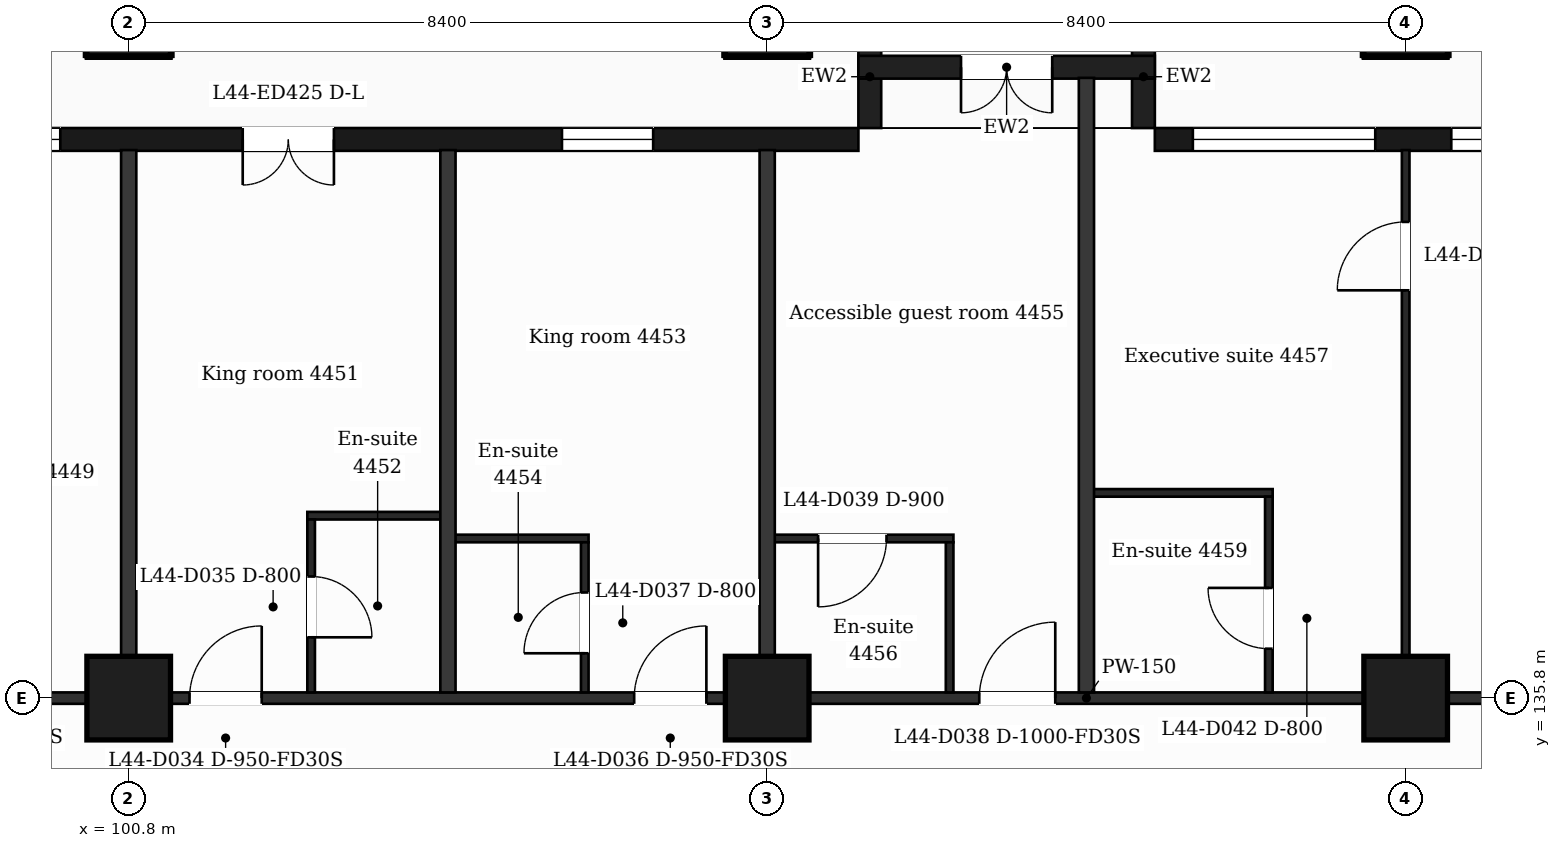
"""IFC4 building model, lengths in metres.
Left out: names, types, materials, properties, quantities, classifications, styles, units other than length and angle.
Written with IfcOpenShell. Run it as: python <this file> out.ifc"""

import sys

from ifc_helpers import new_model, si_unit, direction, frame, frame_2d, origin, origin_2d, place, context, subcontext, project, spatial, rectangle, extrude, element, fill, save


model = new_model("IFC4")
c1 = context("Model", 3, precision=1e-05, world=origin(), true_north=direction((0.0, 1.0)))
c2 = subcontext(c1, "Body", "Model", "MODEL_VIEW")
j1 = project(units=[si_unit("LENGTHUNIT", "METRE"), si_unit("PLANEANGLEUNIT", "RADIAN")], contexts=[c1])
p1 = place(None, origin())
s1 = spatial("IfcSite", under=j1, at=p1, CompositionType="ELEMENT")
p2 = place(p1, origin())
s2 = spatial("IfcBuilding", under=s1, at=p2, CompositionType="ELEMENT")
p3 = place(p2, frame((0.0, 0.0, 184.8)))
s3 = spatial("IfcBuildingStorey", under=s2, at=p3, CompositionType="ELEMENT", Elevation=184.8)
for number, where, z_axis, x_axis in (
    (1, (100.8, 135.8, 0.0), (0.0, 0.0, 1.0), (1.0, 0.0, 0.0)),
    (2, (109.2, 135.8, 0.0), (0.0, 0.0, 1.0), (1.0, 0.0, 0.0)),
    (3, (117.6, 135.8, 0.0), (0.0, 0.0, 1.0), (1.0, 0.0, 0.0)),
    (4, (100.8, 144.8, 0.0), (0.0, 0.0, 1.0), (1.0, 0.0, 0.0)),
    (5, (109.2, 144.8, 0.0), (0.0, 0.0, 1.0), (1.0, 0.0, 0.0)),
    (6, (117.6, 144.8, 0.0), (0.0, 0.0, 1.0), (1.0, 0.0, 0.0)),
):
    element("IfcColumn", number, at=place(p3, frame(where, z_axis=z_axis, x_axis=x_axis)), inside=s3, PredefinedType="COLUMN", context=c2, shape_type="SweptSolid", body=[
        extrude(rectangle(XDim=1.1, YDim=1.1, at=origin_2d()), origin(), (0.0, 0.0, 1.0), 3.7),
    ])
p4 = place(p3, frame((130.65, 143.15, 0.0), z_axis=(0.0, 0.0, 1.0), x_axis=(-1.0, 0.0, 0.0)))
e7 = element("IfcWall", 7, at=p4, inside=s3, PredefinedType="SOLIDWALL", context=c2, shape_type="SweptSolid", body=[
    extrude(rectangle(XDim=16.35, YDim=0.3, at=frame_2d((8.175, 0.0))), origin(), (0.0, 0.0, 1.0), 3.38),
])
p5 = place(p4, frame((1.35, 0.0, 0.9)))
e8 = element("IfcOpeningElement", 8, at=p5, cuts=e7, PredefinedType="OPENING", context=c2, shape_type="SweptSolid", body=[
    extrude(rectangle(XDim=2.4, YDim=2.1, at=frame_2d((1.2, 1.05))), frame((0.0, 0.16, 0.0), z_axis=(0.0, -1.0, 0.0), x_axis=(1.0, 0.0, 0.0)), (0.0, 0.0, 1.0), 0.32),
])
p6 = place(p4, frame((5.55, 0.0, 0.9)))
e9 = element("IfcOpeningElement", 9, at=p6, cuts=e7, PredefinedType="OPENING", context=c2, shape_type="SweptSolid", body=[
    extrude(rectangle(XDim=2.4, YDim=2.1, at=frame_2d((1.2, 1.05))), frame((0.0, 0.16, 0.0), z_axis=(0.0, -1.0, 0.0), x_axis=(1.0, 0.0, 0.0)), (0.0, 0.0, 1.0), 0.32),
])
p7 = place(p4, frame((9.45, 0.0, 0.0)))
e10 = element("IfcOpeningElement", 10, at=p7, cuts=e7, PredefinedType="OPENING", context=c2, shape_type="SweptSolid", body=[
    extrude(rectangle(XDim=1.2, YDim=2.4, at=frame_2d((0.6, 1.2))), frame((0.0, 0.16, 0.0), z_axis=(0.0, -1.0, 0.0), x_axis=(1.0, 0.0, 0.0)), (0.0, 0.0, 1.0), 0.32),
])
p8 = place(p4, frame((11.25, 0.0, 0.9)))
e11 = element("IfcOpeningElement", 11, at=p8, cuts=e7, PredefinedType="OPENING", context=c2, shape_type="SweptSolid", body=[
    extrude(rectangle(XDim=1.2, YDim=2.1, at=frame_2d((0.6, 1.05))), frame((0.0, 0.16, 0.0), z_axis=(0.0, -1.0, 0.0), x_axis=(1.0, 0.0, 0.0)), (0.0, 0.0, 1.0), 0.32),
])
p9 = place(p4, frame((13.45, 0.0, 0.9)))
e12 = element("IfcOpeningElement", 12, at=p9, cuts=e7, PredefinedType="OPENING", context=c2, shape_type="SweptSolid", body=[
    extrude(rectangle(XDim=2.4, YDim=2.1, at=frame_2d((1.2, 1.05))), frame((0.0, 0.16, 0.0), z_axis=(0.0, -1.0, 0.0), x_axis=(1.0, 0.0, 0.0)), (0.0, 0.0, 1.0), 0.32),
])
p10 = place(p3, frame((110.4, 143.15, 0.0), z_axis=(0.0, 0.0, 1.0), x_axis=(-1.0, 0.0, 0.0)))
e13 = element("IfcWall", 13, at=p10, inside=s3, PredefinedType="SOLIDWALL", context=c2, shape_type="SweptSolid", body=[
    extrude(rectangle(XDim=14.4, YDim=0.3, at=frame_2d((7.2, 0.0))), origin(), (0.0, 0.0, 1.0), 3.38),
])
p11 = place(p10, frame((2.7, 0.0, 0.9)))
e14 = element("IfcOpeningElement", 14, at=p11, cuts=e13, PredefinedType="OPENING", context=c2, shape_type="SweptSolid", body=[
    extrude(rectangle(XDim=1.2, YDim=2.1, at=frame_2d((0.6, 1.05))), frame((0.0, 0.16, 0.0), z_axis=(0.0, -1.0, 0.0), x_axis=(1.0, 0.0, 0.0)), (0.0, 0.0, 1.0), 0.32),
])
p12 = place(p10, frame((6.9, 0.0, 0.0)))
e15 = element("IfcOpeningElement", 15, at=p12, cuts=e13, PredefinedType="OPENING", context=c2, shape_type="SweptSolid", body=[
    extrude(rectangle(XDim=1.2, YDim=2.4, at=frame_2d((0.6, 1.2))), frame((0.0, 0.16, 0.0), z_axis=(0.0, -1.0, 0.0), x_axis=(1.0, 0.0, 0.0)), (0.0, 0.0, 1.0), 0.32),
])
p13 = place(p10, frame((10.5, 0.0, 0.9)))
e16 = element("IfcOpeningElement", 16, at=p13, cuts=e13, PredefinedType="OPENING", context=c2, shape_type="SweptSolid", body=[
    extrude(rectangle(XDim=2.4, YDim=2.1, at=frame_2d((1.2, 1.05))), frame((0.0, 0.16, 0.0), z_axis=(0.0, -1.0, 0.0), x_axis=(1.0, 0.0, 0.0)), (0.0, 0.0, 1.0), 0.32),
])
for number, where, z_axis, x_axis in (
    (17, (114.15, 143.3, 0.0), (0.0, 0.0, 1.0), (0.0, 1.0, 0.0)),
    (18, (110.55, 143.3, 0.0), (0.0, 0.0, 1.0), (0.0, 1.0, 0.0)),
):
    element("IfcWall", number, at=place(p3, frame(where, z_axis=z_axis, x_axis=x_axis)), inside=s3, PredefinedType="SOLIDWALL", context=c2, shape_type="SweptSolid", body=[
        extrude(rectangle(XDim=1.35, YDim=0.3, at=frame_2d((0.675, 0.0))), origin(), (0.0, 0.0, 1.0), 3.38),
    ])
p14 = place(p3, frame((114.3, 144.1, 0.0), z_axis=(0.0, 0.0, 1.0), x_axis=(-1.0, 0.0, 0.0)))
e19 = element("IfcWall", 19, at=p14, inside=s3, PredefinedType="SOLIDWALL", context=c2, shape_type="SweptSolid", body=[
    extrude(rectangle(XDim=3.9, YDim=0.3, at=frame_2d((1.95, 0.0))), origin(), (0.0, 0.0, 1.0), 3.38),
])
p15 = place(p14, frame((1.35, 0.0, 0.0)))
e20 = element("IfcOpeningElement", 20, at=p15, cuts=e19, PredefinedType="OPENING", context=c2, shape_type="SweptSolid", body=[
    extrude(rectangle(XDim=1.2, YDim=2.4, at=frame_2d((0.6, 1.2))), frame((0.0, 0.16, 0.0), z_axis=(0.0, -1.0, 0.0), x_axis=(1.0, 0.0, 0.0)), (0.0, 0.0, 1.0), 0.32),
])
p16 = place(p3, frame((90.895, 135.8, 0.0), z_axis=(0.0, 0.0, 1.0), x_axis=(1.0, 0.0, 0.0)))
e21 = element("IfcWall", 21, at=p16, inside=s3, PredefinedType="PARTITIONING", context=c2, shape_type="SweptSolid", body=[
    extrude(rectangle(XDim=45.011, YDim=0.15, at=frame_2d((22.505, 0.0))), origin(), (0.0, 0.0, 1.0), 3.38),
])
p17 = place(p16, frame((6.906, 0.0, 0.0)))
e22 = element("IfcOpeningElement", 22, at=p17, cuts=e21, PredefinedType="OPENING", context=c2, shape_type="SweptSolid", body=[
    extrude(rectangle(XDim=1.0, YDim=2.1, at=frame_2d((0.5, 1.05))), frame((0.0, 0.085, 0.0), z_axis=(0.0, -1.0, 0.0), x_axis=(1.0, 0.0, 0.0)), (0.0, 0.0, 1.0), 0.17),
])
p18 = place(p16, frame((10.705, 0.0, 0.0)))
e23 = element("IfcOpeningElement", 23, at=p18, cuts=e21, PredefinedType="OPENING", context=c2, shape_type="SweptSolid", body=[
    extrude(rectangle(XDim=0.95, YDim=2.1, at=frame_2d((0.475, 1.05))), frame((0.0, 0.085, 0.0), z_axis=(0.0, -1.0, 0.0), x_axis=(1.0, 0.0, 0.0)), (0.0, 0.0, 1.0), 0.17),
])
p19 = place(p16, frame((16.555, 0.0, 0.0)))
e24 = element("IfcOpeningElement", 24, at=p19, cuts=e21, PredefinedType="OPENING", context=c2, shape_type="SweptSolid", body=[
    extrude(rectangle(XDim=0.95, YDim=2.1, at=frame_2d((0.475, 1.05))), frame((0.0, 0.085, 0.0), z_axis=(0.0, -1.0, 0.0), x_axis=(1.0, 0.0, 0.0)), (0.0, 0.0, 1.0), 0.17),
])
p20 = place(p16, frame((21.095, 0.0, 0.0)))
e25 = element("IfcOpeningElement", 25, at=p20, cuts=e21, PredefinedType="OPENING", context=c2, shape_type="SweptSolid", body=[
    extrude(rectangle(XDim=1.0, YDim=2.1, at=frame_2d((0.5, 1.05))), frame((0.0, 0.085, 0.0), z_axis=(0.0, -1.0, 0.0), x_axis=(1.0, 0.0, 0.0)), (0.0, 0.0, 1.0), 0.17),
])
p21 = place(p16, frame((30.406, 0.0, 0.0)))
e26 = element("IfcOpeningElement", 26, at=p21, cuts=e21, PredefinedType="OPENING", context=c2, shape_type="SweptSolid", body=[
    extrude(rectangle(XDim=1.0, YDim=2.1, at=frame_2d((0.5, 1.05))), frame((0.0, 0.085, 0.0), z_axis=(0.0, -1.0, 0.0), x_axis=(1.0, 0.0, 0.0)), (0.0, 0.0, 1.0), 0.17),
])
p22 = place(p16, frame((39.814, 0.0, 0.0)))
e27 = element("IfcOpeningElement", 27, at=p22, cuts=e21, PredefinedType="OPENING", context=c2, shape_type="SweptSolid", body=[
    extrude(rectangle(XDim=0.95, YDim=2.1, at=frame_2d((0.475, 1.05))), frame((0.0, 0.085, 0.0), z_axis=(0.0, -1.0, 0.0), x_axis=(1.0, 0.0, 0.0)), (0.0, 0.0, 1.0), 0.17),
])
p23 = place(p3, frame((105.0, 137.9, 0.0), z_axis=(0.0, 0.0, 1.0), x_axis=(1.0, 0.0, 0.0)))
e28 = element("IfcWall", 28, at=p23, inside=s3, PredefinedType="PARTITIONING", context=c2, shape_type="SweptSolid", body=[
    extrude(rectangle(XDim=1.85, YDim=0.1, at=frame_2d((0.925, 0.0))), origin(), (0.0, 0.0, 1.0), 3.38),
])
p24 = place(p3, frame((109.2, 137.9, 0.0), z_axis=(0.0, 0.0, 1.0), x_axis=(1.0, 0.0, 0.0)))
e29 = element("IfcWall", 29, at=p24, inside=s3, PredefinedType="PARTITIONING", context=c2, shape_type="SweptSolid", body=[
    extrude(rectangle(XDim=2.45, YDim=0.1, at=frame_2d((1.225, 0.0))), origin(), (0.0, 0.0, 1.0), 3.38),
])
p25 = place(p24, frame((0.67, 0.0, 0.0)))
e30 = element("IfcOpeningElement", 30, at=p25, cuts=e29, PredefinedType="OPENING", context=c2, shape_type="SweptSolid", body=[
    extrude(rectangle(XDim=0.9, YDim=2.1, at=frame_2d((0.45, 1.05))), frame((0.0, 0.06, 0.0), z_axis=(0.0, -1.0, 0.0), x_axis=(1.0, 0.0, 0.0)), (0.0, 0.0, 1.0), 0.12),
])
p26 = place(p3, frame((103.15, 138.2, 0.0), z_axis=(0.0, 0.0, 1.0), x_axis=(1.0, 0.0, 0.0)))
e31 = element("IfcWall", 31, at=p26, inside=s3, PredefinedType="PARTITIONING", context=c2, shape_type="SweptSolid", body=[
    extrude(rectangle(XDim=1.85, YDim=0.1, at=frame_2d((0.925, 0.0))), origin(), (0.0, 0.0, 1.0), 3.38),
])
p27 = place(p3, frame((113.4, 138.5, 0.0), z_axis=(0.0, 0.0, 1.0), x_axis=(1.0, 0.0, 0.0)))
e32 = element("IfcWall", 32, at=p27, inside=s3, PredefinedType="PARTITIONING", context=c2, shape_type="SweptSolid", body=[
    extrude(rectangle(XDim=2.45, YDim=0.1, at=frame_2d((1.225, 0.0))), origin(), (0.0, 0.0, 1.0), 3.38),
])
p28 = place(p3, frame((100.8, 135.875, 0.0), z_axis=(0.0, 0.0, 1.0), x_axis=(0.0, 1.0, 0.0)))
e33 = element("IfcWall", 33, at=p28, inside=s3, PredefinedType="PARTITIONING", context=c2, shape_type="SweptSolid", body=[
    extrude(rectangle(XDim=7.135, YDim=0.2, at=frame_2d((3.567, 0.0))), origin(), (0.0, 0.0, 1.0), 3.38),
])
p29 = place(p3, frame((103.2, 135.875, 0.0), z_axis=(0.0, 0.0, 1.0), x_axis=(0.0, 1.0, 0.0)))
e34 = element("IfcWall", 34, at=p29, inside=s3, PredefinedType="PARTITIONING", context=c2, shape_type="SweptSolid", body=[
    extrude(rectangle(XDim=2.275, YDim=0.1, at=frame_2d((1.137, 0.0))), origin(), (0.0, 0.0, 1.0), 3.38),
])
p30 = place(p29, frame((0.725, 0.0, 0.0)))
e35 = element("IfcOpeningElement", 35, at=p30, cuts=e34, PredefinedType="OPENING", context=c2, shape_type="SweptSolid", body=[
    extrude(rectangle(XDim=0.8, YDim=2.1, at=frame_2d((0.4, 1.05))), frame((0.0, 0.06, 0.0), z_axis=(0.0, -1.0, 0.0), x_axis=(1.0, 0.0, 0.0)), (0.0, 0.0, 1.0), 0.12),
])
p31 = place(p3, frame((105.0, 135.875, 0.0), z_axis=(0.0, 0.0, 1.0), x_axis=(0.0, 1.0, 0.0)))
e36 = element("IfcWall", 36, at=p31, inside=s3, PredefinedType="PARTITIONING", context=c2, shape_type="SweptSolid", body=[
    extrude(rectangle(XDim=7.135, YDim=0.2, at=frame_2d((3.567, 0.0))), origin(), (0.0, 0.0, 1.0), 3.38),
])
p32 = place(p3, frame((106.8, 135.875, 0.0), z_axis=(0.0, 0.0, 1.0), x_axis=(0.0, 1.0, 0.0)))
e37 = element("IfcWall", 37, at=p32, inside=s3, PredefinedType="PARTITIONING", context=c2, shape_type="SweptSolid", body=[
    extrude(rectangle(XDim=1.975, YDim=0.1, at=frame_2d((0.988, 0.0))), origin(), (0.0, 0.0, 1.0), 3.38),
])
p33 = place(p32, frame((0.515, 0.0, 0.0)))
e38 = element("IfcOpeningElement", 38, at=p33, cuts=e37, PredefinedType="OPENING", context=c2, shape_type="SweptSolid", body=[
    extrude(rectangle(XDim=0.8, YDim=2.1, at=frame_2d((0.4, 1.05))), frame((0.0, 0.06, 0.0), z_axis=(0.0, -1.0, 0.0), x_axis=(1.0, 0.0, 0.0)), (0.0, 0.0, 1.0), 0.12),
])
p34 = place(p3, frame((109.2, 135.875, 0.0), z_axis=(0.0, 0.0, 1.0), x_axis=(0.0, 1.0, 0.0)))
e39 = element("IfcWall", 39, at=p34, inside=s3, PredefinedType="PARTITIONING", context=c2, shape_type="SweptSolid", body=[
    extrude(rectangle(XDim=7.135, YDim=0.2, at=frame_2d((3.567, 0.0))), origin(), (0.0, 0.0, 1.0), 3.38),
])
p35 = place(p3, frame((111.6, 135.875, 0.0), z_axis=(0.0, 0.0, 1.0), x_axis=(0.0, 1.0, 0.0)))
e40 = element("IfcWall", 40, at=p35, inside=s3, PredefinedType="PARTITIONING", context=c2, shape_type="SweptSolid", body=[
    extrude(rectangle(XDim=1.975, YDim=0.1, at=frame_2d((0.988, 0.0))), origin(), (0.0, 0.0, 1.0), 3.38),
])
p36 = place(p3, frame((113.4, 135.875, 0.0), z_axis=(0.0, 0.0, 1.0), x_axis=(0.0, 1.0, 0.0)))
e41 = element("IfcWall", 41, at=p36, inside=s3, PredefinedType="PARTITIONING", context=c2, shape_type="SweptSolid", body=[
    extrude(rectangle(XDim=8.085, YDim=0.2, at=frame_2d((4.042, 0.0))), origin(), (0.0, 0.0, 1.0), 3.38),
])
p37 = place(p3, frame((115.8, 135.875, 0.0), z_axis=(0.0, 0.0, 1.0), x_axis=(0.0, 1.0, 0.0)))
e42 = element("IfcWall", 42, at=p37, inside=s3, PredefinedType="PARTITIONING", context=c2, shape_type="SweptSolid", body=[
    extrude(rectangle(XDim=2.575, YDim=0.1, at=frame_2d((1.288, 0.0))), origin(), (0.0, 0.0, 1.0), 3.38),
])
p38 = place(p37, frame((0.575, 0.0, 0.0)))
e43 = element("IfcOpeningElement", 43, at=p38, cuts=e42, PredefinedType="OPENING", context=c2, shape_type="SweptSolid", body=[
    extrude(rectangle(XDim=0.8, YDim=2.1, at=frame_2d((0.4, 1.05))), frame((0.0, 0.06, 0.0), z_axis=(0.0, -1.0, 0.0), x_axis=(1.0, 0.0, 0.0)), (0.0, 0.0, 1.0), 0.12),
])
p39 = place(p3, frame((117.6, 135.875, 0.0), z_axis=(0.0, 0.0, 1.0), x_axis=(0.0, 1.0, 0.0)))
e44 = element("IfcWall", 44, at=p39, inside=s3, PredefinedType="PARTITIONING", context=c2, shape_type="SweptSolid", body=[
    extrude(rectangle(XDim=7.135, YDim=0.1, at=frame_2d((3.567, 0.0))), origin(), (0.0, 0.0, 1.0), 3.38),
])
p40 = place(p39, frame((5.29, 0.0, 0.0)))
e45 = element("IfcOpeningElement", 45, at=p40, cuts=e44, PredefinedType="OPENING", context=c2, shape_type="SweptSolid", body=[
    extrude(rectangle(XDim=0.9, YDim=2.1, at=frame_2d((0.45, 1.05))), frame((0.0, 0.06, 0.0), z_axis=(0.0, -1.0, 0.0), x_axis=(1.0, 0.0, 0.0)), (0.0, 0.0, 1.0), 0.12),
])
p41 = place(p8, origin())
e46 = element("IfcWindow", 46, at=p41, inside=s3, PartitioningType="SINGLE_PANEL", PredefinedType="WINDOW", context=c2, shape_type="SweptSolid", body=[
    extrude(rectangle(XDim=1.2, YDim=2.1, at=frame_2d((0.6, 1.05))), frame((0.0, 0.03, 0.0), z_axis=(0.0, -1.0, 0.0), x_axis=(1.0, 0.0, 0.0)), (0.0, 0.0, 1.0), 0.06),
])
fill(e11, e46)
p42 = place(p9, origin())
e47 = element("IfcWindow", 47, at=p42, inside=s3, PartitioningType="SINGLE_PANEL", PredefinedType="WINDOW", context=c2, shape_type="SweptSolid", body=[
    extrude(rectangle(XDim=2.4, YDim=2.1, at=frame_2d((1.2, 1.05))), frame((0.0, 0.03, 0.0), z_axis=(0.0, -1.0, 0.0), x_axis=(1.0, 0.0, 0.0)), (0.0, 0.0, 1.0), 0.06),
])
fill(e12, e47)
p43 = place(p11, origin())
e48 = element("IfcWindow", 48, at=p43, inside=s3, PartitioningType="SINGLE_PANEL", PredefinedType="WINDOW", context=c2, shape_type="SweptSolid", body=[
    extrude(rectangle(XDim=1.2, YDim=2.1, at=frame_2d((0.6, 1.05))), frame((0.0, 0.03, 0.0), z_axis=(0.0, -1.0, 0.0), x_axis=(1.0, 0.0, 0.0)), (0.0, 0.0, 1.0), 0.06),
])
fill(e14, e48)
p44 = place(p12, origin())
e49 = element("IfcDoor", 49, at=p44, inside=s3, OperationType="DOUBLE_DOOR_SINGLE_SWING", PredefinedType="DOOR", context=c2, shape_type="SweptSolid", body=[
    extrude(rectangle(XDim=1.2, YDim=2.4, at=frame_2d((0.6, 1.2))), frame((0.0, 0.025, 0.0), z_axis=(0.0, -1.0, 0.0), x_axis=(1.0, 0.0, 0.0)), (0.0, 0.0, 1.0), 0.05),
])
fill(e15, e49)
p45 = place(p13, origin())
e50 = element("IfcWindow", 50, at=p45, inside=s3, PartitioningType="SINGLE_PANEL", PredefinedType="WINDOW", context=c2, shape_type="SweptSolid", body=[
    extrude(rectangle(XDim=2.4, YDim=2.1, at=frame_2d((1.2, 1.05))), frame((0.0, 0.03, 0.0), z_axis=(0.0, -1.0, 0.0), x_axis=(1.0, 0.0, 0.0)), (0.0, 0.0, 1.0), 0.06),
])
fill(e16, e50)
p46 = place(p15, origin())
e51 = element("IfcDoor", 51, at=p46, inside=s3, OperationType="DOUBLE_DOOR_SINGLE_SWING", PredefinedType="DOOR", context=c2, shape_type="SweptSolid", body=[
    extrude(rectangle(XDim=1.2, YDim=2.4, at=frame_2d((0.6, 1.2))), frame((0.0, 0.025, 0.0), z_axis=(0.0, -1.0, 0.0), x_axis=(1.0, 0.0, 0.0)), (0.0, 0.0, 1.0), 0.05),
])
fill(e20, e51)
p47 = place(p18, origin())
e52 = element("IfcDoor", 52, at=p47, inside=s3, OperationType="SINGLE_SWING_RIGHT", PredefinedType="DOOR", context=c2, shape_type="SweptSolid", body=[
    extrude(rectangle(XDim=0.95, YDim=2.1, at=frame_2d((0.475, 1.05))), frame((0.0, 0.025, 0.0), z_axis=(0.0, -1.0, 0.0), x_axis=(1.0, 0.0, 0.0)), (0.0, 0.0, 1.0), 0.05),
])
fill(e23, e52)
p48 = place(p30, origin())
e53 = element("IfcDoor", 53, at=p48, inside=s3, OperationType="SINGLE_SWING_LEFT", PredefinedType="DOOR", context=c2, shape_type="SweptSolid", body=[
    extrude(rectangle(XDim=0.8, YDim=2.1, at=frame_2d((0.4, 1.05))), frame((0.0, 0.025, 0.0), z_axis=(0.0, -1.0, 0.0), x_axis=(1.0, 0.0, 0.0)), (0.0, 0.0, 1.0), 0.05),
])
fill(e35, e53)
p49 = place(p19, origin())
e54 = element("IfcDoor", 54, at=p49, inside=s3, OperationType="SINGLE_SWING_RIGHT", PredefinedType="DOOR", context=c2, shape_type="SweptSolid", body=[
    extrude(rectangle(XDim=0.95, YDim=2.1, at=frame_2d((0.475, 1.05))), frame((0.0, 0.025, 0.0), z_axis=(0.0, -1.0, 0.0), x_axis=(1.0, 0.0, 0.0)), (0.0, 0.0, 1.0), 0.05),
])
fill(e24, e54)
p50 = place(p33, origin())
e55 = element("IfcDoor", 55, at=p50, inside=s3, OperationType="SINGLE_SWING_LEFT", PredefinedType="DOOR", context=c2, shape_type="SweptSolid", body=[
    extrude(rectangle(XDim=0.8, YDim=2.1, at=frame_2d((0.4, 1.05))), frame((0.0, 0.025, 0.0), z_axis=(0.0, -1.0, 0.0), x_axis=(1.0, 0.0, 0.0)), (0.0, 0.0, 1.0), 0.05),
])
fill(e38, e55)
p51 = place(p20, origin())
e56 = element("IfcDoor", 56, at=p51, inside=s3, OperationType="SINGLE_SWING_RIGHT", PredefinedType="DOOR", context=c2, shape_type="SweptSolid", body=[
    extrude(rectangle(XDim=1.0, YDim=2.1, at=frame_2d((0.5, 1.05))), frame((0.0, 0.025, 0.0), z_axis=(0.0, -1.0, 0.0), x_axis=(1.0, 0.0, 0.0)), (0.0, 0.0, 1.0), 0.05),
])
fill(e25, e56)
p52 = place(p25, origin())
e57 = element("IfcDoor", 57, at=p52, inside=s3, OperationType="SINGLE_SWING_LEFT", PredefinedType="DOOR", context=c2, shape_type="SweptSolid", body=[
    extrude(rectangle(XDim=0.9, YDim=2.1, at=frame_2d((0.45, 1.05))), frame((0.0, 0.025, 0.0), z_axis=(0.0, -1.0, 0.0), x_axis=(1.0, 0.0, 0.0)), (0.0, 0.0, 1.0), 0.05),
])
fill(e30, e57)
p53 = place(p40, origin())
e58 = element("IfcDoor", 58, at=p53, inside=s3, OperationType="SINGLE_SWING_LEFT", PredefinedType="DOOR", context=c2, shape_type="SweptSolid", body=[
    extrude(rectangle(XDim=0.9, YDim=2.1, at=frame_2d((0.45, 1.05))), frame((0.0, 0.025, 0.0), z_axis=(0.0, -1.0, 0.0), x_axis=(1.0, 0.0, 0.0)), (0.0, 0.0, 1.0), 0.05),
])
fill(e45, e58)
p54 = place(p38, origin())
e59 = element("IfcDoor", 59, at=p54, inside=s3, OperationType="SINGLE_SWING_RIGHT", PredefinedType="DOOR", context=c2, shape_type="SweptSolid", body=[
    extrude(rectangle(XDim=0.8, YDim=2.1, at=frame_2d((0.4, 1.05))), frame((0.0, 0.025, 0.0), z_axis=(0.0, -1.0, 0.0), x_axis=(1.0, 0.0, 0.0)), (0.0, 0.0, 1.0), 0.05),
])
fill(e43, e59)
save(model, sys.argv[1])
